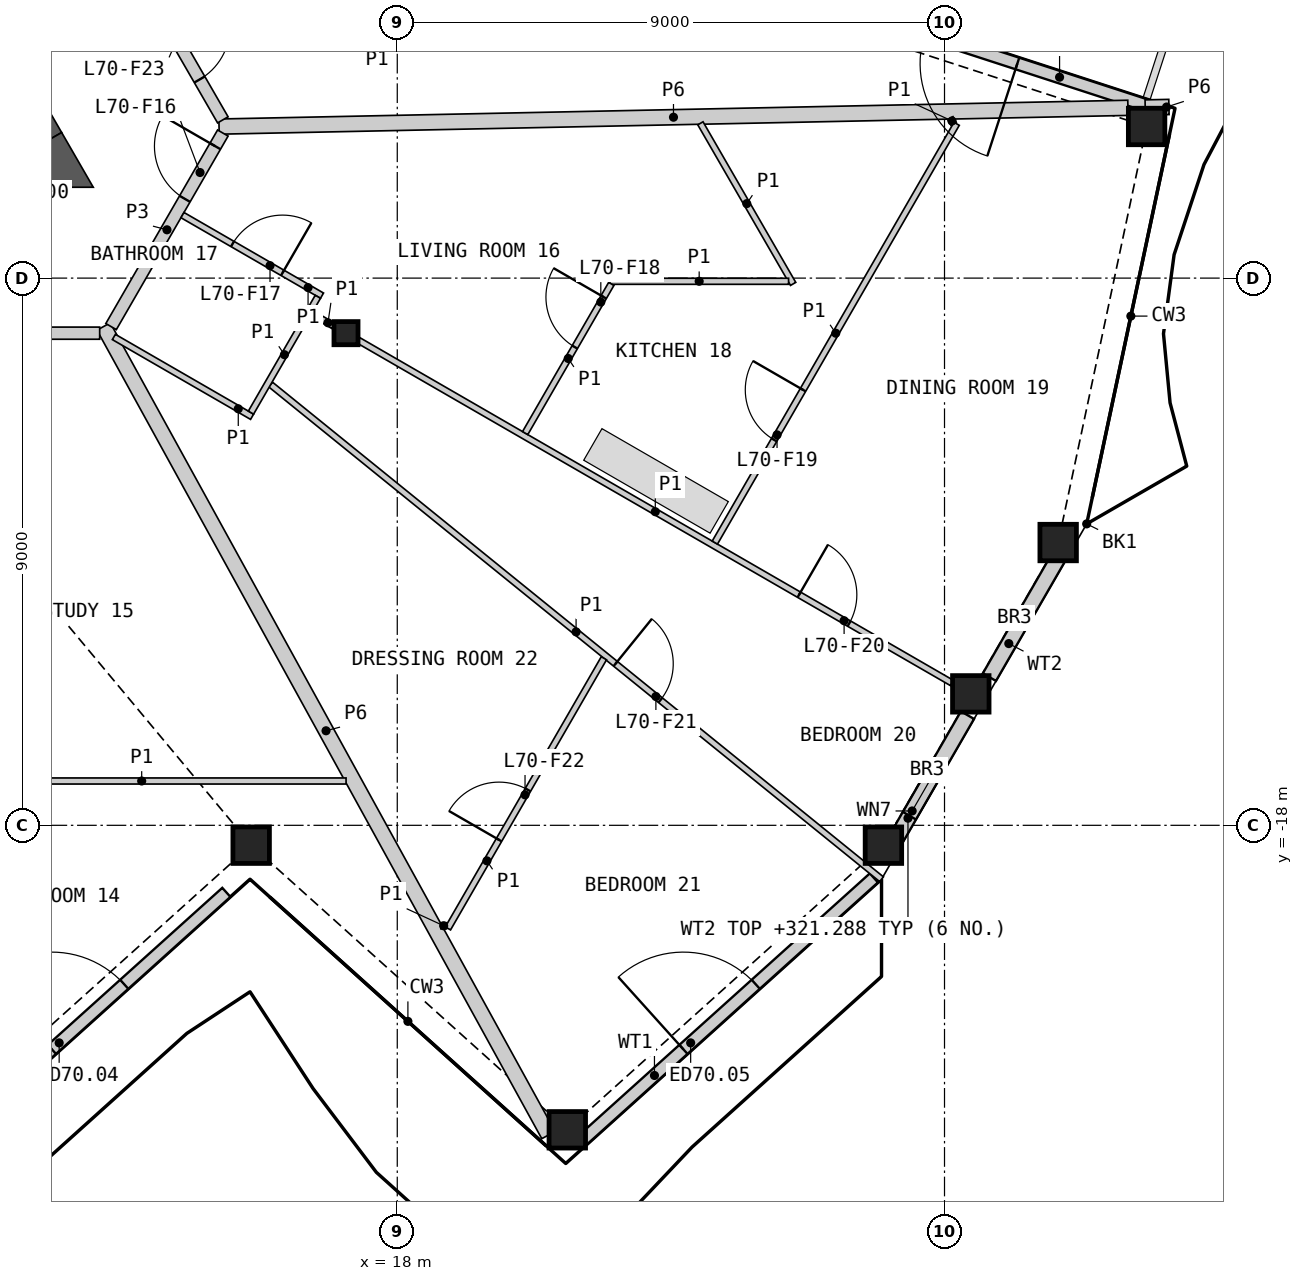
"""IFC4 building model, lengths in metres.
Left out: names, types, materials, properties, quantities, classifications, styles, units other than length and angle.
Written with IfcOpenShell. Run it as: python <this file> out.ifc"""

import sys

from ifc_helpers import new_model, si_unit, direction, frame, frame_2d, origin, origin_2d, place, context, subcontext, project, spatial, polyline, rectangle, hollow_rectangle, i_section, outline, extrude, element, fill, save


model = new_model("IFC4")
c1 = context("Model", 3, precision=1e-05, world=origin(), true_north=direction((0.0, 1.0)))
c2 = subcontext(c1, "Body", "Model", "MODEL_VIEW")
j1 = project(units=[si_unit("LENGTHUNIT", "METRE"), si_unit("PLANEANGLEUNIT", "RADIAN")], contexts=[c1])
p1 = place(None, origin())
s1 = spatial("IfcSite", under=j1, at=p1, CompositionType="ELEMENT")
p2 = place(p1, origin())
s2 = spatial("IfcBuilding", under=s1, at=p2, CompositionType="ELEMENT")
p3 = place(p2, frame((0.0, 0.0, 318.8)))
s3 = spatial("IfcBuildingStorey", under=s2, at=p3, CompositionType="ELEMENT", Elevation=318.8)
for number, where, z_axis, x_axis in (
    (1, (15.597, -18.327, 0.0), (0.0, 0.0, 1.0), (1.0, 0.0, 0.0)),
    (2, (20.796, -23.008, 0.0), (0.0, 0.0, 1.0), (1.0, 0.0, 0.0)),
    (3, (25.995, -18.327, 0.0), (0.0, 0.0, 1.0), (1.0, 0.0, 0.0)),
    (4, (27.432, -15.838, 0.0), (0.0, 0.0, 1.0), (1.0, 0.0, 0.0)),
    (5, (28.869, -13.349, 0.0), (0.0, 0.0, 1.0), (1.0, 0.0, 0.0)),
    (6, (30.324, -6.506, 0.0), (0.0, 0.0, 1.0), (1.0, 0.0, 0.0)),
):
    element("IfcColumn", number, at=place(p3, frame(where, z_axis=z_axis, x_axis=x_axis)), inside=s3, PredefinedType="COLUMN", context=c2, shape_type="SweptSolid", body=[
        extrude(hollow_rectangle(XDim=0.6, YDim=0.6, WallThickness=0.04, at=origin_2d()), origin(), (0.0, 0.0, 1.0), 3.4),
    ])
p4 = place(p3, frame((17.157, -9.906, 0.0), z_axis=(0.0, 0.0, 1.0), x_axis=(1.0, 0.0, 0.0)))
e7 = element("IfcColumn", 7, at=p4, inside=s3, PredefinedType="COLUMN", context=c2, shape_type="SweptSolid", body=[
    extrude(i_section(OverallWidth=0.396, OverallDepth=0.381, WebThickness=0.019, FlangeThickness=0.03, at=origin_2d()), origin(), (0.0, 0.0, 1.0), 3.4),
])
p5 = place(p3, frame((10.641, -23.198, 0.0), z_axis=(0.0, 0.0, 1.0), x_axis=(0.743121537674, 0.66915646918, 0.0)))
e8 = element("IfcWall", 8, at=p5, inside=s3, PredefinedType="SOLIDWALL", context=c2, shape_type="SweptSolid", body=[
    extrude(rectangle(XDim=6.12, YDim=0.2, at=frame_2d((3.06, 0.0))), origin(), (0.0, 0.0, 1.0), 2.488),
])
p6 = place(p5, frame((2.26, 0.0, 0.0)))
e9 = element("IfcOpeningElement", 9, at=p6, cuts=e8, PredefinedType="OPENING", context=c2, shape_type="SweptSolid", body=[
    extrude(rectangle(XDim=1.6, YDim=2.25, at=frame_2d((0.8, 1.125))), frame((0.0, 0.11, 0.0), z_axis=(0.0, -1.0, 0.0), x_axis=(1.0, 0.0, 0.0)), (0.0, 0.0, 1.0), 0.22),
])
p7 = place(p3, frame((21.027, -23.198, 0.0), z_axis=(0.0, 0.0, 1.0), x_axis=(0.74314788005, 0.669127213897, 0.0)))
e10 = element("IfcWall", 10, at=p7, inside=s3, PredefinedType="SOLIDWALL", context=c2, shape_type="SweptSolid", body=[
    extrude(rectangle(XDim=6.475, YDim=0.2, at=frame_2d((3.237, 0.0))), origin(), (0.0, 0.0, 1.0), 2.488),
])
p8 = place(p7, frame((2.26, 0.0, 0.0)))
e11 = element("IfcOpeningElement", 11, at=p8, cuts=e10, PredefinedType="OPENING", context=c2, shape_type="SweptSolid", body=[
    extrude(rectangle(XDim=1.6, YDim=2.25, at=frame_2d((0.8, 1.125))), frame((0.0, 0.11, 0.0), z_axis=(0.0, -1.0, 0.0), x_axis=(1.0, 0.0, 0.0)), (0.0, 0.0, 1.0), 0.22),
])
p9 = place(p3, frame((26.073, -18.448, 0.0), z_axis=(0.0, 0.0, 1.0), x_axis=(0.499992367345, 0.866029810455, 0.0)))
e12 = element("IfcWall", 12, at=p9, inside=s3, PredefinedType="SOLIDWALL", context=c2, shape_type="SweptSolid", body=[
    extrude(rectangle(XDim=2.61, YDim=0.25, at=frame_2d((1.305, 0.0))), origin(), (0.0, 0.0, 1.0), 2.488),
])
p10 = place(p9, frame((0.7, 0.0, 1.6)))
e13 = element("IfcOpeningElement", 13, at=p10, cuts=e12, PredefinedType="OPENING", context=c2, shape_type="SweptSolid", body=[
    extrude(rectangle(XDim=0.9, YDim=0.6, at=frame_2d((0.45, 0.3))), frame((0.0, 0.135, 0.0), z_axis=(0.0, -1.0, 0.0), x_axis=(1.0, 0.0, 0.0)), (0.0, 0.0, 1.0), 0.27),
])
p11 = place(p3, frame((27.739, -15.563, 0.0), z_axis=(0.0, 0.0, 1.0), x_axis=(0.500012659481, 0.866018094706, 0.0)))
e14 = element("IfcWall", 14, at=p11, inside=s3, PredefinedType="SOLIDWALL", context=c2, shape_type="SweptSolid", body=[
    extrude(rectangle(XDim=2.549, YDim=0.25, at=frame_2d((1.274, 0.0))), origin(), (0.0, 0.0, 1.0), 2.488),
])
p12 = place(p3, frame((30.347, -6.168, 0.0), z_axis=(0.0, 0.0, 1.0), x_axis=(-0.951053709789, 0.309025631781, 0.0)))
e15 = element("IfcWall", 15, at=p12, inside=s3, PredefinedType="SOLIDWALL", context=c2, shape_type="SweptSolid", body=[
    extrude(rectangle(XDim=6.12, YDim=0.2, at=frame_2d((3.06, 0.0))), origin(), (0.0, 0.0, 1.0), 2.488),
])
p13 = place(p12, frame((2.26, 0.0, 0.0)))
e16 = element("IfcOpeningElement", 16, at=p13, cuts=e15, PredefinedType="OPENING", context=c2, shape_type="SweptSolid", body=[
    extrude(rectangle(XDim=1.6, YDim=2.25, at=frame_2d((0.8, 1.125))), frame((0.0, 0.11, 0.0), z_axis=(0.0, -1.0, 0.0), x_axis=(1.0, 0.0, 0.0)), (0.0, 0.0, 1.0), 0.22),
])
p14 = place(p3, frame((12.221, -6.756, 0.0), z_axis=(0.0, 0.0, 1.0), x_axis=(-0.50000604952, 0.866021911064, 0.0)))
e17 = element("IfcWall", 17, at=p14, inside=s3, PredefinedType="SHEAR", context=c2, shape_type="SweptSolid", body=[
    extrude(rectangle(XDim=4.869, YDim=0.6, at=frame_2d((2.434, 0.0))), origin(), (0.0, 0.0, 1.0), 3.1),
])
p15 = place(p3, origin())
e18 = element("IfcWall", 18, at=p15, inside=s3, PredefinedType="SHEAR", context=c2, shape_type="SweptSolid", body=[
    extrude(outline(polyline([(11.961, -7.506), (11.961, -6.906), (12.48, -6.606), (13.0, -7.506), (11.961, -7.506)])), origin(), (0.0, 0.0, 1.0), 3.1),
])
p16 = place(p3, frame((13.171, -9.796, 0.0), z_axis=(0.0, 0.0, 1.0), x_axis=(0.481999020381, -0.876171755053, 0.0)))
e19 = element("IfcWall", 19, at=p16, inside=s3, PredefinedType="PARTITIONING", context=c2, shape_type="SweptSolid", body=[
    extrude(rectangle(XDim=15.178, YDim=0.25, at=frame_2d((7.589, 0.0))), origin(), (0.0, 0.0, 1.0), 2.33),
])
p17 = place(p3, frame((15.069, -6.508, 0.0), z_axis=(0.0, 0.0, 1.0), x_axis=(0.999786619639, 0.02065708573, 0.0)))
e20 = element("IfcWall", 20, at=p17, inside=s3, PredefinedType="PARTITIONING", context=c2, shape_type="SweptSolid", body=[
    extrude(rectangle(XDim=14.951, YDim=0.25, at=frame_2d((7.475, 0.0))), origin(), (0.0, 0.0, 1.0), 2.33),
])
p18 = place(p3, frame((8.786, -9.906, 0.0), z_axis=(0.0, 0.0, 1.0), x_axis=(1.0, 0.0, 0.0)))
e21 = element("IfcWall", 21, at=p18, inside=s3, PredefinedType="PARTITIONING", context=c2, shape_type="SweptSolid", body=[
    extrude(rectangle(XDim=4.32, YDim=0.2, at=frame_2d((2.16, 0.0))), origin(), (0.0, 0.0, 1.0), 3.1),
])
p19 = place(p3, frame((12.988, -2.684, 0.0), z_axis=(0.0, 0.0, 1.0), x_axis=(0.500003406062, -0.866023437285, 0.0)))
e22 = element("IfcWall", 22, at=p19, inside=s3, PredefinedType="PARTITIONING", context=c2, shape_type="SweptSolid", body=[
    extrude(rectangle(XDim=4.288, YDim=0.2, at=frame_2d((2.144, 0.0))), origin(), (0.0, 0.0, 1.0), 3.1),
])
p20 = place(p19, frame((2.521, 0.0, 0.0)))
e23 = element("IfcOpeningElement", 23, at=p20, cuts=e22, PredefinedType="OPENING", context=c2, shape_type="SweptSolid", body=[
    extrude(rectangle(XDim=1.0, YDim=2.1, at=frame_2d((0.5, 1.05))), frame((0.0, 0.11, 0.0), z_axis=(0.0, -1.0, 0.0), x_axis=(1.0, 0.0, 0.0)), (0.0, 0.0, 1.0), 0.22),
])
p21 = place(p3, frame((13.293, -9.797, 0.0), z_axis=(0.0, 0.0, 1.0), x_axis=(0.499967746641, 0.866044024469, 0.0)))
e24 = element("IfcWall", 24, at=p21, inside=s3, PredefinedType="PARTITIONING", context=c2, shape_type="SweptSolid", body=[
    extrude(rectangle(XDim=3.676, YDim=0.2, at=frame_2d((1.838, 0.0))), origin(), (0.0, 0.0, 1.0), 3.1),
])
p22 = place(p21, frame((2.426, 0.0, 0.0)))
e25 = element("IfcOpeningElement", 25, at=p22, cuts=e24, PredefinedType="OPENING", context=c2, shape_type="SweptSolid", body=[
    extrude(rectangle(XDim=1.0, YDim=2.1, at=frame_2d((0.5, 1.05))), frame((0.0, 0.11, 0.0), z_axis=(0.0, -1.0, 0.0), x_axis=(1.0, 0.0, 0.0)), (0.0, 0.0, 1.0), 0.22),
])
p23 = place(p3, frame((30.301, -6.193, 0.0), z_axis=(0.0, 0.0, 1.0), x_axis=(0.999786840126, 0.020646411592, 0.0)))
e26 = element("IfcWall", 26, at=p23, inside=s3, PredefinedType="PARTITIONING", context=c2, shape_type="SweptSolid", body=[
    extrude(rectangle(XDim=0.39, YDim=0.25, at=frame_2d((0.195, 0.0))), origin(), (0.0, 0.0, 1.0), 2.33),
])
p24 = place(p3, frame((15.917, -10.751, 0.0), z_axis=(0.0, 0.0, 1.0), x_axis=(0.777149866095, -0.629315569193, 0.0)))
e27 = element("IfcWall", 27, at=p24, inside=s3, PredefinedType="PARTITIONING", context=c2, shape_type="SweptSolid", body=[
    extrude(rectangle(XDim=12.927, YDim=0.1, at=frame_2d((6.464, 0.0))), origin(), (0.0, 0.0, 1.0), 2.33),
])
p25 = place(p24, frame((7.298, 0.0, 0.0)))
e28 = element("IfcOpeningElement", 28, at=p25, cuts=e27, PredefinedType="OPENING", context=c2, shape_type="SweptSolid", body=[
    extrude(rectangle(XDim=0.95, YDim=2.1, at=frame_2d((0.475, 1.05))), frame((0.0, 0.06, 0.0), z_axis=(0.0, -1.0, 0.0), x_axis=(1.0, 0.0, 0.0)), (0.0, 0.0, 1.0), 0.12),
])
p26 = place(p3, frame((17.365, -10.025, 0.0), z_axis=(0.0, 0.0, 1.0), x_axis=(0.866021046153, -0.500007547564, 0.0)))
e29 = element("IfcWall", 29, at=p26, inside=s3, PredefinedType="PARTITIONING", context=c2, shape_type="SweptSolid", body=[
    extrude(rectangle(XDim=11.267, YDim=0.1, at=frame_2d((5.634, 0.0))), origin(), (0.0, 0.0, 1.0), 2.33),
])
p27 = place(p26, frame((8.364, 0.0, 0.0)))
e30 = element("IfcOpeningElement", 30, at=p27, cuts=e29, PredefinedType="OPENING", context=c2, shape_type="SweptSolid", body=[
    extrude(rectangle(XDim=0.95, YDim=2.1, at=frame_2d((0.475, 1.05))), frame((0.0, 0.06, 0.0), z_axis=(0.0, -1.0, 0.0), x_axis=(1.0, 0.0, 0.0)), (0.0, 0.0, 1.0), 0.12),
])
p28 = place(p3, frame((23.223, -13.35, 0.0), z_axis=(0.0, 0.0, 1.0), x_axis=(0.500018284498, 0.866014846967, 0.0)))
e31 = element("IfcWall", 31, at=p28, inside=s3, PredefinedType="PARTITIONING", context=c2, shape_type="SweptSolid", body=[
    extrude(rectangle(XDim=7.953, YDim=0.1, at=frame_2d((3.977, 0.0))), origin(), (0.0, 0.0, 1.0), 2.33),
])
p29 = place(p28, frame((1.951, 0.0, 0.0)))
e32 = element("IfcOpeningElement", 32, at=p29, cuts=e31, PredefinedType="OPENING", context=c2, shape_type="SweptSolid", body=[
    extrude(rectangle(XDim=0.95, YDim=2.1, at=frame_2d((0.475, 1.05))), frame((0.0, 0.06, 0.0), z_axis=(0.0, -1.0, 0.0), x_axis=(1.0, 0.0, 0.0)), (0.0, 0.0, 1.0), 0.12),
])
p30 = place(p3, frame((10.436, -17.271, 0.0), z_axis=(0.0, 0.0, 1.0), x_axis=(1.0, 0.0, 0.0)))
e33 = element("IfcWall", 33, at=p30, inside=s3, PredefinedType="PARTITIONING", context=c2, shape_type="SweptSolid", body=[
    extrude(rectangle(XDim=6.722, YDim=0.1, at=frame_2d((3.361, 0.0))), origin(), (0.0, 0.0, 1.0), 2.33),
])
p31 = place(p30, frame((0.757, 0.0, 0.0)))
e34 = element("IfcOpeningElement", 34, at=p31, cuts=e33, PredefinedType="OPENING", context=c2, shape_type="SweptSolid", body=[
    extrude(rectangle(XDim=0.95, YDim=2.1, at=frame_2d((0.475, 1.05))), frame((0.0, 0.06, 0.0), z_axis=(0.0, -1.0, 0.0), x_axis=(1.0, 0.0, 0.0)), (0.0, 0.0, 1.0), 0.12),
])
p32 = place(p3, frame((18.833, -19.695, 0.0), z_axis=(0.0, 0.0, 1.0), x_axis=(0.500034163155, 0.866005678779, 0.0)))
e35 = element("IfcWall", 35, at=p32, inside=s3, PredefinedType="PARTITIONING", context=c2, shape_type="SweptSolid", body=[
    extrude(rectangle(XDim=5.13, YDim=0.1, at=frame_2d((2.565, 0.0))), origin(), (0.0, 0.0, 1.0), 2.33),
])
p33 = place(p32, frame((1.681, 0.0, 0.0)))
e36 = element("IfcOpeningElement", 36, at=p33, cuts=e35, PredefinedType="OPENING", context=c2, shape_type="SweptSolid", body=[
    extrude(rectangle(XDim=0.95, YDim=2.1, at=frame_2d((0.475, 1.05))), frame((0.0, 0.06, 0.0), z_axis=(0.0, -1.0, 0.0), x_axis=(1.0, 0.0, 0.0)), (0.0, 0.0, 1.0), 0.12),
])
p34 = place(p3, frame((22.986, -6.454, 0.0), z_axis=(0.0, 0.0, 1.0), x_axis=(0.499978833458, -0.866037623948, 0.0)))
e37 = element("IfcWall", 37, at=p34, inside=s3, PredefinedType="PARTITIONING", context=c2, shape_type="SweptSolid", body=[
    extrude(rectangle(XDim=3.05, YDim=0.1, at=frame_2d((1.525, 0.0))), origin(), (0.0, 0.0, 1.0), 2.33),
])
p35 = place(p3, frame((21.495, -9.052, 0.0), z_axis=(0.0, 0.0, 1.0), x_axis=(1.0, 0.0, 0.0)))
e38 = element("IfcWall", 38, at=p35, inside=s3, PredefinedType="PARTITIONING", context=c2, shape_type="SweptSolid", body=[
    extrude(rectangle(XDim=2.94, YDim=0.1, at=frame_2d((1.47, 0.0))), origin(), (0.0, 0.0, 1.0), 2.33),
])
p36 = place(p3, frame((20.104, -11.549, 0.0), z_axis=(0.0, 0.0, 1.0), x_axis=(0.499976073514, 0.866039217307, 0.0)))
e39 = element("IfcWall", 39, at=p36, inside=s3, PredefinedType="PARTITIONING", context=c2, shape_type="SweptSolid", body=[
    extrude(rectangle(XDim=2.833, YDim=0.1, at=frame_2d((1.417, 0.0))), origin(), (0.0, 0.0, 1.0), 2.33),
])
p37 = place(p36, frame((1.633, 0.0, 0.0)))
e40 = element("IfcOpeningElement", 40, at=p37, cuts=e39, PredefinedType="OPENING", context=c2, shape_type="SweptSolid", body=[
    extrude(rectangle(XDim=0.95, YDim=2.1, at=frame_2d((0.475, 1.05))), frame((0.0, 0.06, 0.0), z_axis=(0.0, -1.0, 0.0), x_axis=(1.0, 0.0, 0.0)), (0.0, 0.0, 1.0), 0.12),
])
p38 = place(p3, frame((14.468, -7.964, 0.0), z_axis=(0.0, 0.0, 1.0), x_axis=(0.865989200783, -0.500062700197, 0.0)))
e41 = element("IfcWall", 41, at=p38, inside=s3, PredefinedType="PARTITIONING", context=c2, shape_type="SweptSolid", body=[
    extrude(rectangle(XDim=2.65, YDim=0.1, at=frame_2d((1.325, 0.0))), origin(), (0.0, 0.0, 1.0), 2.33),
])
p39 = place(p38, frame((0.95, 0.0, 0.0)))
e42 = element("IfcOpeningElement", 42, at=p39, cuts=e41, PredefinedType="OPENING", context=c2, shape_type="SweptSolid", body=[
    extrude(rectangle(XDim=0.95, YDim=2.1, at=frame_2d((0.475, 1.05))), frame((0.0, 0.06, 0.0), z_axis=(0.0, -1.0, 0.0), x_axis=(1.0, 0.0, 0.0)), (0.0, 0.0, 1.0), 0.12),
])
p40 = place(p3, frame((13.339, -9.968, 0.0), z_axis=(0.0, 0.0, 1.0), x_axis=(0.866013657776, -0.500020344131, 0.0)))
e43 = element("IfcWall", 43, at=p40, inside=s3, PredefinedType="PARTITIONING", context=c2, shape_type="SweptSolid", body=[
    extrude(rectangle(XDim=2.625, YDim=0.1, at=frame_2d((1.312, 0.0))), origin(), (0.0, 0.0, 1.0), 2.33),
])
p41 = place(p3, frame((15.594, -11.212, 0.0), z_axis=(0.0, 0.0, 1.0), x_axis=(0.499981787252, 0.866035918664, 0.0)))
e44 = element("IfcWall", 44, at=p41, inside=s3, PredefinedType="PARTITIONING", context=c2, shape_type="SweptSolid", body=[
    extrude(rectangle(XDim=2.2, YDim=0.1, at=frame_2d((1.1, 0.0))), origin(), (0.0, 0.0, 1.0), 2.33),
])
p42 = place(p3, frame((16.594, -9.581, 0.0), z_axis=(0.0, 0.0, 1.0), x_axis=(0.866036909293, -0.499980071345, 0.0)))
e45 = element("IfcWall", 45, at=p42, inside=s3, PredefinedType="PARTITIONING", context=c2, shape_type="SweptSolid", body=[
    extrude(rectangle(XDim=0.41, YDim=0.1, at=frame_2d((0.205, 0.0))), origin(), (0.0, 0.0, 1.0), 2.33),
])
p43 = place(p3, frame((27.096, -6.369, 0.0), z_axis=(0.0, 0.0, 1.0), x_axis=(0.500768285049, -0.865581379588, 0.0)))
e46 = element("IfcWall", 46, at=p43, inside=s3, PredefinedType="PARTITIONING", context=c2, shape_type="SweptSolid", body=[
    extrude(rectangle(XDim=0.108, YDim=0.1, at=frame_2d((0.054, 0.0))), origin(), (0.0, 0.0, 1.0), 2.33),
])
p44 = place(p3, frame((18.718, -19.652, 0.0), z_axis=(0.0, 0.0, 1.0), x_axis=(1.0, 0.0, 0.0)))
e47 = element("IfcWall", 47, at=p44, inside=s3, PredefinedType="PARTITIONING", context=c2, shape_type="SweptSolid", body=[
    extrude(rectangle(XDim=0.09, YDim=0.1, at=frame_2d((0.045, 0.0))), origin(), (0.0, 0.0, 1.0), 2.33),
])
p45 = place(p6, origin())
e48 = element("IfcDoor", 48, at=p45, inside=s3, OperationType="DOUBLE_DOOR_SINGLE_SWING", PredefinedType="DOOR", context=c2, shape_type="SweptSolid", body=[
    extrude(rectangle(XDim=1.6, YDim=2.25, at=frame_2d((0.8, 1.125))), frame((0.0, 0.025, 0.0), z_axis=(0.0, -1.0, 0.0), x_axis=(1.0, 0.0, 0.0)), (0.0, 0.0, 1.0), 0.05),
])
fill(e9, e48)
p46 = place(p8, origin())
e49 = element("IfcDoor", 49, at=p46, inside=s3, OperationType="DOUBLE_DOOR_SINGLE_SWING", PredefinedType="DOOR", context=c2, shape_type="SweptSolid", body=[
    extrude(rectangle(XDim=1.6, YDim=2.25, at=frame_2d((0.8, 1.125))), frame((0.0, 0.025, 0.0), z_axis=(0.0, -1.0, 0.0), x_axis=(1.0, 0.0, 0.0)), (0.0, 0.0, 1.0), 0.05),
])
fill(e11, e49)
p47 = place(p10, origin())
e50 = element("IfcWindow", 50, at=p47, inside=s3, PartitioningType="SINGLE_PANEL", PredefinedType="WINDOW", context=c2, shape_type="SweptSolid", body=[
    extrude(rectangle(XDim=0.9, YDim=0.6, at=frame_2d((0.45, 0.3))), frame((0.0, 0.03, 0.0), z_axis=(0.0, -1.0, 0.0), x_axis=(1.0, 0.0, 0.0)), (0.0, 0.0, 1.0), 0.06),
])
fill(e13, e50)
p48 = place(p13, origin())
e51 = element("IfcDoor", 51, at=p48, inside=s3, OperationType="DOUBLE_DOOR_SINGLE_SWING", PredefinedType="DOOR", context=c2, shape_type="SweptSolid", body=[
    extrude(rectangle(XDim=1.6, YDim=2.25, at=frame_2d((0.8, 1.125))), frame((0.0, 0.025, 0.0), z_axis=(0.0, -1.0, 0.0), x_axis=(1.0, 0.0, 0.0)), (0.0, 0.0, 1.0), 0.05),
])
fill(e16, e51)
p49 = place(p22, origin())
e52 = element("IfcDoor", 52, at=p49, inside=s3, OperationType="SINGLE_SWING_RIGHT", PredefinedType="DOOR", context=c2, shape_type="SweptSolid", body=[
    extrude(rectangle(XDim=1.0, YDim=2.1, at=frame_2d((0.5, 1.05))), frame((0.0, 0.025, 0.0), z_axis=(0.0, -1.0, 0.0), x_axis=(1.0, 0.0, 0.0)), (0.0, 0.0, 1.0), 0.05),
])
fill(e25, e52)
p50 = place(p39, origin())
e53 = element("IfcDoor", 53, at=p50, inside=s3, OperationType="SINGLE_SWING_RIGHT", PredefinedType="DOOR", context=c2, shape_type="SweptSolid", body=[
    extrude(rectangle(XDim=0.95, YDim=2.1, at=frame_2d((0.475, 1.05))), frame((0.0, 0.025, 0.0), z_axis=(0.0, -1.0, 0.0), x_axis=(1.0, 0.0, 0.0)), (0.0, 0.0, 1.0), 0.05),
])
fill(e42, e53)
p51 = place(p37, origin())
e54 = element("IfcDoor", 54, at=p51, inside=s3, OperationType="SINGLE_SWING_RIGHT", PredefinedType="DOOR", context=c2, shape_type="SweptSolid", body=[
    extrude(rectangle(XDim=0.95, YDim=2.1, at=frame_2d((0.475, 1.05))), frame((0.0, 0.025, 0.0), z_axis=(0.0, -1.0, 0.0), x_axis=(1.0, 0.0, 0.0)), (0.0, 0.0, 1.0), 0.05),
])
fill(e40, e54)
p52 = place(p29, origin())
e55 = element("IfcDoor", 55, at=p52, inside=s3, OperationType="SINGLE_SWING_RIGHT", PredefinedType="DOOR", context=c2, shape_type="SweptSolid", body=[
    extrude(rectangle(XDim=0.95, YDim=2.1, at=frame_2d((0.475, 1.05))), frame((0.0, 0.025, 0.0), z_axis=(0.0, -1.0, 0.0), x_axis=(1.0, 0.0, 0.0)), (0.0, 0.0, 1.0), 0.05),
])
fill(e32, e55)
p53 = place(p27, origin())
e56 = element("IfcDoor", 56, at=p53, inside=s3, OperationType="SINGLE_SWING_LEFT", PredefinedType="DOOR", context=c2, shape_type="SweptSolid", body=[
    extrude(rectangle(XDim=0.95, YDim=2.1, at=frame_2d((0.475, 1.05))), frame((0.0, 0.025, 0.0), z_axis=(0.0, -1.0, 0.0), x_axis=(1.0, 0.0, 0.0)), (0.0, 0.0, 1.0), 0.05),
])
fill(e30, e56)
p54 = place(p25, origin())
e57 = element("IfcDoor", 57, at=p54, inside=s3, OperationType="SINGLE_SWING_LEFT", PredefinedType="DOOR", context=c2, shape_type="SweptSolid", body=[
    extrude(rectangle(XDim=0.95, YDim=2.1, at=frame_2d((0.475, 1.05))), frame((0.0, 0.025, 0.0), z_axis=(0.0, -1.0, 0.0), x_axis=(1.0, 0.0, 0.0)), (0.0, 0.0, 1.0), 0.05),
])
fill(e28, e57)
p55 = place(p33, origin())
e58 = element("IfcDoor", 58, at=p55, inside=s3, OperationType="SINGLE_SWING_LEFT", PredefinedType="DOOR", context=c2, shape_type="SweptSolid", body=[
    extrude(rectangle(XDim=0.95, YDim=2.1, at=frame_2d((0.475, 1.05))), frame((0.0, 0.025, 0.0), z_axis=(0.0, -1.0, 0.0), x_axis=(1.0, 0.0, 0.0)), (0.0, 0.0, 1.0), 0.05),
])
fill(e36, e58)
p56 = place(p20, origin())
e59 = element("IfcDoor", 59, at=p56, inside=s3, OperationType="SINGLE_SWING_LEFT", PredefinedType="DOOR", context=c2, shape_type="SweptSolid", body=[
    extrude(rectangle(XDim=1.0, YDim=2.1, at=frame_2d((0.5, 1.05))), frame((0.0, 0.025, 0.0), z_axis=(0.0, -1.0, 0.0), x_axis=(1.0, 0.0, 0.0)), (0.0, 0.0, 1.0), 0.05),
])
fill(e23, e59)
save(model, sys.argv[1])
